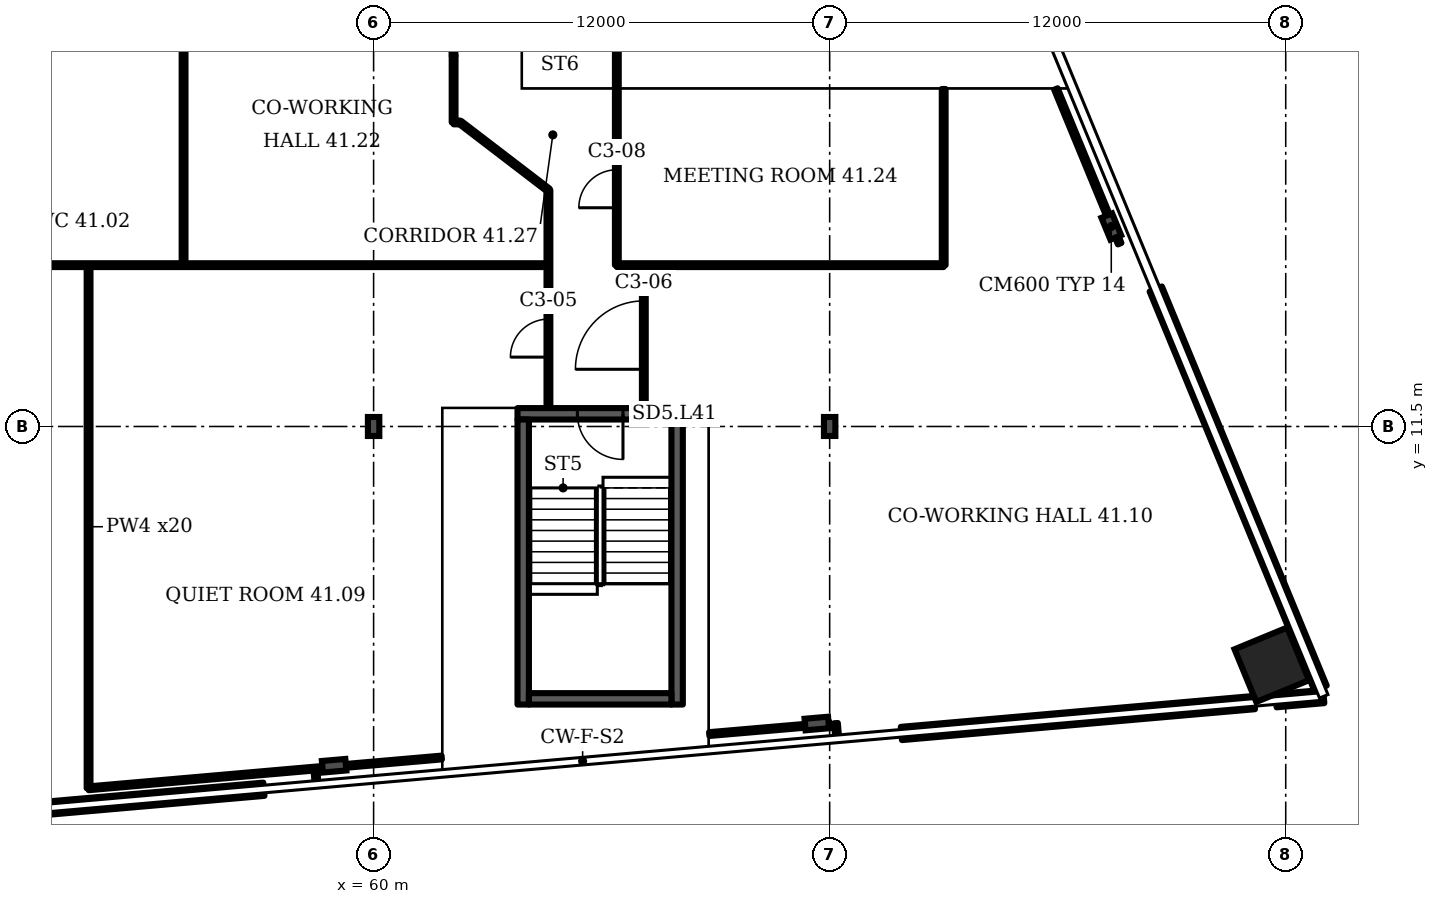
"""IFC4 building model, lengths in metres.
Left out: names, types, materials, properties, quantities, classifications, styles, units other than length and angle.
Written with IfcOpenShell. Run it as: python <this file> out.ifc"""

import sys

from ifc_helpers import new_model, si_unit, direction, frame, frame_2d, origin, origin_2d, place, context, subcontext, project, spatial, rectangle, i_section, extrude, element, fill, save


model = new_model("IFC4")
c1 = context("Model", 3, precision=1e-05, world=origin(), true_north=direction((0.0, 1.0)))
c2 = subcontext(c1, "Body", "Model", "MODEL_VIEW")
j1 = project(units=[si_unit("LENGTHUNIT", "METRE"), si_unit("PLANEANGLEUNIT", "RADIAN")], contexts=[c1])
p1 = place(None, origin())
s1 = spatial("IfcSite", under=j1, at=p1, CompositionType="ELEMENT")
p2 = place(p1, origin())
s2 = spatial("IfcBuilding", under=s1, at=p2, CompositionType="ELEMENT")
p3 = place(p2, frame((0.0, 0.0, 169.9)))
s3 = spatial("IfcBuildingStorey", under=s2, at=p3, CompositionType="ELEMENT", Elevation=169.9)
p4 = place(p3, frame((83.633, 5.231, 0.0), z_axis=(0.0, 0.0, 1.0), x_axis=(-0.381602, 0.924325, 0.0)))
e1 = element("IfcColumn", 1, at=p4, inside=s3, PredefinedType="COLUMN", context=c2, shape_type="SweptSolid", body=[
    extrude(rectangle(XDim=1.5, YDim=1.5, at=origin_2d()), origin(), (0.0, 0.0, 1.0), 3.6),
])
for number, where, z_axis, x_axis in (
    (2, (58.961, 2.573, 0.0), (0.0, 0.0, 1.0), (0.087, -0.996, 0.0)),
    (3, (71.662, 3.685, 0.0), (0.0, 0.0, 1.0), (0.087, -0.996, 0.0)),
    (4, (79.41, 16.762, 0.0), (0.0, 0.0, 1.0), (0.924, 0.382, 0.0)),
):
    element("IfcColumn", number, at=place(p3, frame(where, z_axis=z_axis, x_axis=x_axis)), inside=s3, PredefinedType="COLUMN", context=c2, shape_type="SweptSolid", body=[
        extrude(i_section(OverallWidth=0.305, OverallDepth=0.62, WebThickness=0.021, FlangeThickness=0.04, FilletRadius=0.027, at=origin_2d()), origin(), (0.0, 0.0, 1.0), 3.6),
    ])
for number, where, z_axis, x_axis in (
    (5, (60.0, 11.5, 0.0), (0.0, 0.0, 1.0), (1.0, 0.0, 0.0)),
    (6, (72.0, 11.5, 0.0), (0.0, 0.0, 1.0), (1.0, 0.0, 0.0)),
):
    element("IfcColumn", number, at=place(p3, frame(where, z_axis=z_axis, x_axis=x_axis)), inside=s3, PredefinedType="COLUMN", context=c2, shape_type="SweptSolid", body=[
        extrude(i_section(OverallWidth=0.3, OverallDepth=0.5, WebThickness=0.014, FlangeThickness=0.028, FilletRadius=0.027, at=origin_2d()), origin(), (0.0, 0.0, 1.0), 3.6),
    ])
p5 = place(p3, frame((46.045, 0.987, 0.0), z_axis=(0.0, 0.0, 1.0), x_axis=(0.996193, 0.087171, 0.0)))
e7 = element("IfcWall", 7, at=p5, inside=s3, PredefinedType="SOLIDWALL", context=c2, shape_type="SweptSolid", body=[
    extrude(rectangle(XDim=11.11, YDim=0.35, at=frame_2d((5.555, 0.0))), origin(), (0.0, 0.0, 1.0), 1.0),
])
p6 = place(p3, frame((73.887, 3.423, 0.0), z_axis=(0.0, 0.0, 1.0), x_axis=(0.996197, 0.087145, 0.0)))
e8 = element("IfcWall", 8, at=p6, inside=s3, PredefinedType="SOLIDWALL", context=c2, shape_type="SweptSolid", body=[
    extrude(rectangle(XDim=9.323, YDim=0.35, at=frame_2d((4.662, 0.0))), origin(), (0.0, 0.0, 1.0), 1.0),
])
p7 = place(p3, frame((83.745, 4.285, 0.0), z_axis=(0.0, 0.0, 1.0), x_axis=(0.996198, 0.087148, 0.0)))
e9 = element("IfcWall", 9, at=p7, inside=s3, PredefinedType="SOLIDWALL", context=c2, shape_type="SweptSolid", body=[
    extrude(rectangle(XDim=1.261, YDim=0.35, at=frame_2d((0.63, 0.0))), origin(), (0.0, 0.0, 1.0), 1.0),
])
p8 = place(p3, frame((84.916, 4.616, 0.0), z_axis=(0.0, 0.0, 1.0), x_axis=(-0.381598, 0.924328, 0.0)))
e10 = element("IfcWall", 10, at=p8, inside=s3, PredefinedType="SOLIDWALL", context=c2, shape_type="SweptSolid", body=[
    extrude(rectangle(XDim=11.361, YDim=0.35, at=frame_2d((5.68, 0.0))), origin(), (0.0, 0.0, 1.0), 1.0),
])
p9 = place(p3, frame((63.786, 11.834, 0.0), z_axis=(0.0, 0.0, 1.0), x_axis=(1.0, 0.0, 0.0)))
e11 = element("IfcWall", 11, at=p9, inside=s3, PredefinedType="SHEAR", context=c2, shape_type="SweptSolid", body=[
    extrude(rectangle(XDim=4.35, YDim=0.3, at=frame_2d((2.175, 0.0))), origin(), (0.0, 0.0, 1.0), 3.2),
])
p10 = place(p9, frame((1.575, 0.0, 0.0)))
e12 = element("IfcOpeningElement", 12, at=p10, cuts=e11, PredefinedType="OPENING", context=c2, shape_type="SweptSolid", body=[
    extrude(rectangle(XDim=1.2, YDim=2.1, at=frame_2d((0.6, 1.05))), frame((0.0, 0.16, 0.0), z_axis=(0.0, -1.0, 0.0), x_axis=(1.0, 0.0, 0.0)), (0.0, 0.0, 1.0), 0.32),
])
p11 = place(p3, frame((46.91, 15.745, 0.0), z_axis=(0.0, 0.0, 1.0), x_axis=(1.0, 0.0, 0.0)))
e13 = element("IfcWall", 13, at=p11, inside=s3, PredefinedType="PARTITIONING", context=c2, shape_type="SweptSolid", body=[
    extrude(rectangle(XDim=17.69, YDim=0.1, at=frame_2d((8.845, 0.0))), origin(), (0.0, 0.0, 1.0), 3.2),
])
p12 = place(p3, frame((52.5, 1.98, 0.0), z_axis=(0.0, 0.0, 1.0), x_axis=(0.0, 1.0, 0.0)))
e14 = element("IfcWall", 14, at=p12, inside=s3, PredefinedType="PARTITIONING", context=c2, shape_type="SweptSolid", body=[
    extrude(rectangle(XDim=13.765, YDim=0.1, at=frame_2d((6.883, 0.0))), origin(), (0.0, 0.0, 1.0), 3.2),
])
p13 = place(p3, frame((52.5, 1.98, 0.0), z_axis=(0.0, 0.0, 1.0), x_axis=(0.99622, 0.086844, 0.0)))
e15 = element("IfcWall", 15, at=p13, inside=s3, PredefinedType="PARTITIONING", context=c2, shape_type="SweptSolid", body=[
    extrude(rectangle(XDim=9.328, YDim=0.1, at=frame_2d((4.664, 0.0))), origin(), (0.0, 0.0, 1.0), 2.58),
])
p14 = place(p3, frame((55.0, 15.745, 0.0), z_axis=(0.0, 0.0, 1.0), x_axis=(0.0, 1.0, 0.0)))
e16 = element("IfcWall", 16, at=p14, inside=s3, PredefinedType="PARTITIONING", context=c2, shape_type="SweptSolid", body=[
    extrude(rectangle(XDim=13.855, YDim=0.1, at=frame_2d((6.927, 0.0))), origin(), (0.0, 0.0, 1.0), 3.2),
])
p15 = place(p3, frame((58.498, 2.102, 0.0), z_axis=(0.0, 0.0, 1.0), x_axis=(-0.083045, 0.996542, 0.0)))
e17 = element("IfcWall", 17, at=p15, inside=s3, PredefinedType="PARTITIONING", context=c2, shape_type="SweptSolid", body=[
    extrude(rectangle(XDim=0.4, YDim=0.1, at=frame_2d((0.2, 0.0))), origin(), (0.0, 0.0, 1.0), 3.2),
])
p16 = place(p3, frame((62.105, 19.5, 0.0), z_axis=(0.0, 0.0, 1.0), x_axis=(0.0, 1.0, 0.0)))
e18 = element("IfcWall", 18, at=p16, inside=s3, PredefinedType="PARTITIONING", context=c2, shape_type="SweptSolid", body=[
    extrude(rectangle(XDim=1.75, YDim=0.1, at=frame_2d((0.875, 0.0))), origin(), (0.0, 0.0, 1.0), 3.2),
])
p17 = place(p3, frame((62.105, 19.5, 0.0), z_axis=(0.0, 0.0, 1.0), x_axis=(1.0, 0.0, 0.0)))
e19 = element("IfcWall", 19, at=p17, inside=s3, PredefinedType="PARTITIONING", context=c2, shape_type="SweptSolid", body=[
    extrude(rectangle(XDim=0.17, YDim=0.1, at=frame_2d((0.085, 0.0))), origin(), (0.0, 0.0, 1.0), 3.2),
])
p18 = place(p3, frame((62.105, 21.25, 0.0), z_axis=(0.0, 0.0, 1.0), x_axis=(-0.047011, 0.998895, 0.0)))
e20 = element("IfcWall", 20, at=p18, inside=s3, PredefinedType="PARTITIONING", context=c2, shape_type="SweptSolid", body=[
    extrude(rectangle(XDim=1.381, YDim=0.1, at=frame_2d((0.691, 0.0))), origin(), (0.0, 0.0, 1.0), 3.2),
])
p19 = place(p3, frame((64.6, 12.004, 0.0), z_axis=(0.0, 0.0, 1.0), x_axis=(0.0, 1.0, 0.0)))
e21 = element("IfcWall", 21, at=p19, inside=s3, PredefinedType="PARTITIONING", context=c2, shape_type="SweptSolid", body=[
    extrude(rectangle(XDim=5.716, YDim=0.1, at=frame_2d((2.858, 0.0))), origin(), (0.0, 0.0, 1.0), 3.2),
])
p20 = place(p19, frame((1.321, 0.0, 0.0)))
e22 = element("IfcOpeningElement", 22, at=p20, cuts=e21, PredefinedType="OPENING", context=c2, shape_type="SweptSolid", body=[
    extrude(rectangle(XDim=1.0, YDim=2.1, at=frame_2d((0.5, 1.05))), frame((0.0, 0.06, 0.0), z_axis=(0.0, -1.0, 0.0), x_axis=(1.0, 0.0, 0.0)), (0.0, 0.0, 1.0), 0.12),
])
p21 = place(p3, frame((64.6, 17.72, 0.0), z_axis=(0.0, 0.0, 1.0), x_axis=(-0.794036, 0.607866, 0.0)))
e23 = element("IfcWall", 23, at=p21, inside=s3, PredefinedType="PARTITIONING", context=c2, shape_type="SweptSolid", body=[
    extrude(rectangle(XDim=2.928, YDim=0.1, at=frame_2d((1.464, 0.0))), origin(), (0.0, 0.0, 1.0), 3.2),
])
p22 = place(p3, frame((66.4, 15.745, 0.0), z_axis=(0.0, 0.0, 1.0), x_axis=(0.0, 1.0, 0.0)))
e24 = element("IfcWall", 24, at=p22, inside=s3, PredefinedType="PARTITIONING", context=c2, shape_type="SweptSolid", body=[
    extrude(rectangle(XDim=5.98, YDim=0.1, at=frame_2d((2.99, 0.0))), origin(), (0.0, 0.0, 1.0), 3.2),
])
p23 = place(p22, frame((1.51, 0.0, 0.0)))
e25 = element("IfcOpeningElement", 25, at=p23, cuts=e24, PredefinedType="OPENING", context=c2, shape_type="SweptSolid", body=[
    extrude(rectangle(XDim=1.0, YDim=2.1, at=frame_2d((0.5, 1.05))), frame((0.0, 0.06, 0.0), z_axis=(0.0, -1.0, 0.0), x_axis=(1.0, 0.0, 0.0)), (0.0, 0.0, 1.0), 0.12),
])
p24 = place(p3, frame((66.4, 15.745, 0.0), z_axis=(0.0, 0.0, 1.0), x_axis=(1.0, 0.0, 0.0)))
e26 = element("IfcWall", 26, at=p24, inside=s3, PredefinedType="PARTITIONING", context=c2, shape_type="SweptSolid", body=[
    extrude(rectangle(XDim=8.6, YDim=0.1, at=frame_2d((4.3, 0.0))), origin(), (0.0, 0.0, 1.0), 3.2),
])
p25 = place(p3, frame((67.11, 12.004, 0.0), z_axis=(0.0, 0.0, 1.0), x_axis=(0.0, 1.0, 0.0)))
e27 = element("IfcWall", 27, at=p25, inside=s3, PredefinedType="PARTITIONING", context=c2, shape_type="SweptSolid", body=[
    extrude(rectangle(XDim=3.741, YDim=0.1, at=frame_2d((1.871, 0.0))), origin(), (0.0, 0.0, 1.0), 3.2),
])
p26 = place(p25, frame((1.001, 0.0, 0.0)))
e28 = element("IfcOpeningElement", 28, at=p26, cuts=e27, PredefinedType="OPENING", context=c2, shape_type="SweptSolid", body=[
    extrude(rectangle(XDim=1.8, YDim=2.1, at=frame_2d((0.9, 1.05))), frame((0.0, 0.06, 0.0), z_axis=(0.0, -1.0, 0.0), x_axis=(1.0, 0.0, 0.0)), (0.0, 0.0, 1.0), 0.12),
])
p27 = place(p3, frame((68.831, 3.407, 0.0), z_axis=(0.0, 0.0, 1.0), x_axis=(0.996308, 0.085898, 0.0)))
e29 = element("IfcWall", 29, at=p27, inside=s3, PredefinedType="PARTITIONING", context=c2, shape_type="SweptSolid", body=[
    extrude(rectangle(XDim=3.18, YDim=0.1, at=frame_2d((1.59, 0.0))), origin(), (0.0, 0.0, 1.0), 2.58),
])
p28 = place(p3, frame((72.198, 3.3, 0.0), z_axis=(0.0, 0.0, 1.0), x_axis=(-0.083759, 0.996486, 0.0)))
e30 = element("IfcWall", 30, at=p28, inside=s3, PredefinedType="PARTITIONING", context=c2, shape_type="SweptSolid", body=[
    extrude(rectangle(XDim=0.396, YDim=0.1, at=frame_2d((0.198, 0.0))), origin(), (0.0, 0.0, 1.0), 3.2),
])
p29 = place(p3, frame((75.0, 15.745, 0.0), z_axis=(0.0, 0.0, 1.0), x_axis=(0.0, 1.0, 0.0)))
e31 = element("IfcWall", 31, at=p29, inside=s3, PredefinedType="PARTITIONING", context=c2, shape_type="SweptSolid", body=[
    extrude(rectangle(XDim=4.635, YDim=0.1, at=frame_2d((2.317, 0.0))), origin(), (0.0, 0.0, 1.0), 3.2),
])
p30 = place(p3, frame((79.63, 16.31, 0.0), z_axis=(0.0, 0.0, 1.0), x_axis=(-0.380933, 0.9246, 0.0)))
e32 = element("IfcWall", 32, at=p30, inside=s3, PredefinedType="PARTITIONING", context=c2, shape_type="SweptSolid", body=[
    extrude(rectangle(XDim=4.402, YDim=0.1, at=frame_2d((2.201, 0.0))), origin(), (0.0, 0.0, 1.0), 2.58),
])
for number, where, z_axis, x_axis in (
    (33, (63.936, 4.184, 0.0), (0.0, 0.0, 1.0), (0.0, 1.0, 0.0)),
    (34, (67.986, 4.184, 0.0), (0.0, 0.0, 1.0), (0.0, 1.0, 0.0)),
):
    element("IfcWall", number, at=place(p3, frame(where, z_axis=z_axis, x_axis=x_axis)), inside=s3, PredefinedType="SHEAR", context=c2, shape_type="SweptSolid", body=[
        extrude(rectangle(XDim=7.5, YDim=0.3, at=frame_2d((3.75, 0.0))), origin(), (0.0, 0.0, 1.0), 3.2),
    ])
p31 = place(p3, frame((64.086, 4.334, 0.0), z_axis=(0.0, 0.0, 1.0), x_axis=(1.0, 0.0, 0.0)))
e35 = element("IfcWall", 35, at=p31, inside=s3, PredefinedType="SHEAR", context=c2, shape_type="SweptSolid", body=[
    extrude(rectangle(XDim=3.75, YDim=0.3, at=frame_2d((1.875, 0.0))), origin(), (0.0, 0.0, 1.0), 3.2),
])
p32 = place(p10, origin())
e36 = element("IfcDoor", 36, at=p32, inside=s3, OperationType="SINGLE_SWING_RIGHT", PredefinedType="DOOR", context=c2, shape_type="SweptSolid", body=[
    extrude(rectangle(XDim=1.2, YDim=2.1, at=frame_2d((0.6, 1.05))), frame((0.0, 0.025, 0.0), z_axis=(0.0, -1.0, 0.0), x_axis=(1.0, 0.0, 0.0)), (0.0, 0.0, 1.0), 0.05),
])
fill(e12, e36)
p33 = place(p20, origin())
e37 = element("IfcDoor", 37, at=p33, inside=s3, OperationType="SINGLE_SWING_LEFT", PredefinedType="DOOR", context=c2, shape_type="SweptSolid", body=[
    extrude(rectangle(XDim=1.0, YDim=2.1, at=frame_2d((0.5, 1.05))), frame((0.0, 0.025, 0.0), z_axis=(0.0, -1.0, 0.0), x_axis=(1.0, 0.0, 0.0)), (0.0, 0.0, 1.0), 0.05),
])
fill(e22, e37)
p34 = place(p26, origin())
e38 = element("IfcDoor", 38, at=p34, inside=s3, OperationType="DOUBLE_DOOR_SINGLE_SWING", PredefinedType="DOOR", context=c2, shape_type="SweptSolid", body=[
    extrude(rectangle(XDim=1.8, YDim=2.1, at=frame_2d((0.9, 1.05))), frame((0.0, 0.025, 0.0), z_axis=(0.0, -1.0, 0.0), x_axis=(1.0, 0.0, 0.0)), (0.0, 0.0, 1.0), 0.05),
])
fill(e28, e38)
p35 = place(p23, origin())
e39 = element("IfcDoor", 39, at=p35, inside=s3, OperationType="SINGLE_SWING_LEFT", PredefinedType="DOOR", context=c2, shape_type="SweptSolid", body=[
    extrude(rectangle(XDim=1.0, YDim=2.1, at=frame_2d((0.5, 1.05))), frame((0.0, 0.025, 0.0), z_axis=(0.0, -1.0, 0.0), x_axis=(1.0, 0.0, 0.0)), (0.0, 0.0, 1.0), 0.05),
])
fill(e25, e39)
save(model, sys.argv[1])
